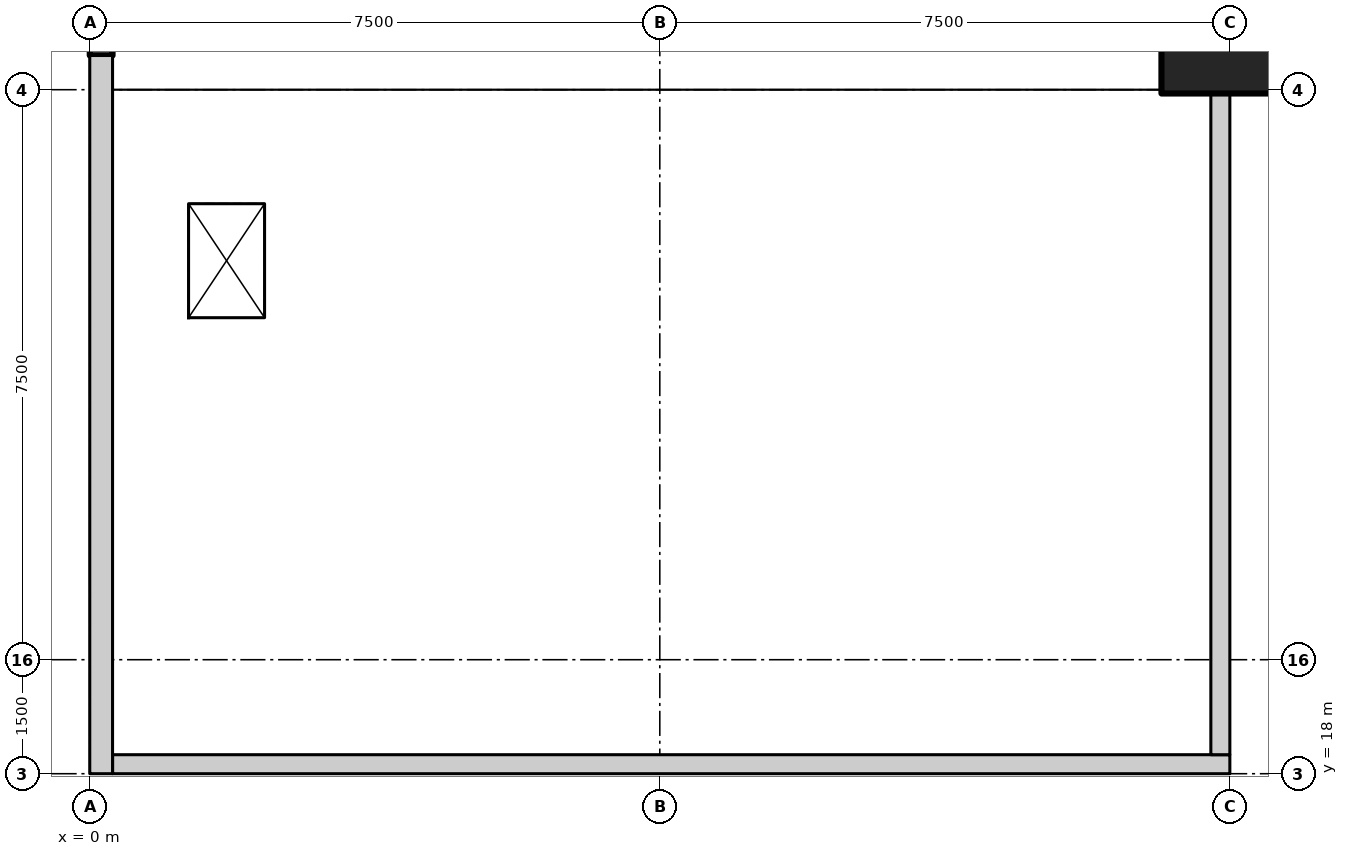
"""IFC4 building model, lengths in metres.
Left out: names, types, materials, properties, quantities, classifications, styles, units other than length and angle.
Written with IfcOpenShell. Run it as: python <this file> out.ifc"""

import sys

from ifc_helpers import new_model, si_unit, direction, frame, frame_2d, origin, origin_2d, place, context, subcontext, project, spatial, rectangle, extrude, element, save


model = new_model("IFC4")
c1 = context("Model", 3, precision=1e-05, world=origin(), true_north=direction((0.0, 1.0)))
c2 = subcontext(c1, "Body", "Model", "MODEL_VIEW")
j1 = project(units=[si_unit("LENGTHUNIT", "METRE"), si_unit("PLANEANGLEUNIT", "RADIAN")], contexts=[c1])
p1 = place(None, origin())
s1 = spatial("IfcSite", under=j1, at=p1, CompositionType="ELEMENT")
p2 = place(p1, origin())
s2 = spatial("IfcBuilding", under=s1, at=p2, CompositionType="ELEMENT")
p3 = place(p2, frame((0.0, 0.0, 10.2)))
s3 = spatial("IfcBuildingStorey", under=s2, at=p3, CompositionType="ELEMENT", Elevation=10.2)
p4 = place(p3, frame((0.15, 27.45, 0.0), z_axis=(0.0, 0.0, 1.0), x_axis=(0.0, 1.0, 0.0)))
e1 = element("IfcWall", 1, at=p4, inside=s3, PredefinedType="SHEAR", context=c2, shape_type="SweptSolid", body=[
    extrude(rectangle(XDim=8.55, YDim=0.3, at=frame_2d((4.275, 0.0))), origin(), (0.0, 0.0, 1.0), 2.85),
])
p5 = place(p3, frame((15.0, 27.45, 0.0), z_axis=(0.0, 0.0, 1.0), x_axis=(1.0, 0.0, 0.0)))
e2 = element("IfcColumn", 2, at=p5, inside=s3, PredefinedType="COLUMN", context=c2, shape_type="SweptSolid", body=[
    extrude(rectangle(XDim=1.8, YDim=1.0, at=origin_2d()), origin(), (0.0, 0.0, 1.0), 4.2),
])
p6 = place(p3, frame((15.0, 18.125, 0.0), z_axis=(0.0, 0.0, 1.0), x_axis=(-1.0, 0.0, 0.0)))
e3 = element("IfcWall", 3, at=p6, inside=s3, PredefinedType="PARAPET", context=c2, shape_type="SweptSolid", body=[
    extrude(rectangle(XDim=14.7, YDim=0.25, at=frame_2d((7.35, 0.0))), origin(), (0.0, 0.0, 1.0), 1.1),
])
p7 = place(p3, frame((14.875, 27.0, 0.0), z_axis=(0.0, 0.0, 1.0), x_axis=(0.0, -1.0, 0.0)))
e4 = element("IfcWall", 4, at=p7, inside=s3, PredefinedType="PARAPET", context=c2, shape_type="SweptSolid", body=[
    extrude(rectangle(XDim=8.75, YDim=0.25, at=frame_2d((4.375, 0.0))), origin(), (0.0, 0.0, 1.0), 1.1),
])
p8 = place(p3, frame((0.15, 18.0, 0.0), z_axis=(0.0, 0.0, 1.0), x_axis=(0.0, 1.0, 0.0)))
e5 = element("IfcWall", 5, at=p8, inside=s3, PredefinedType="PARAPET", context=c2, shape_type="SweptSolid", body=[
    extrude(rectangle(XDim=9.45, YDim=0.3, at=frame_2d((4.725, 0.0))), origin(), (0.0, 0.0, 1.0), 1.1),
])
p9 = place(p3, frame((0.0, 0.0, -0.3)))
p10 = place(p9, frame((1.8, 24.75, 0.0)))
p11 = place(p10, frame((0.0, 0.0, 0.25)))
e6 = element("IfcDoor", 6, at=p11, inside=s3, OperationType="SINGLE_SWING_LEFT", PredefinedType="TRAPDOOR", context=c2, shape_type="SweptSolid", body=[
    extrude(rectangle(XDim=1.0, YDim=1.5, at=origin_2d()), origin(), (0.0, 0.0, 1.0), 0.05),
])
save(model, sys.argv[1])
